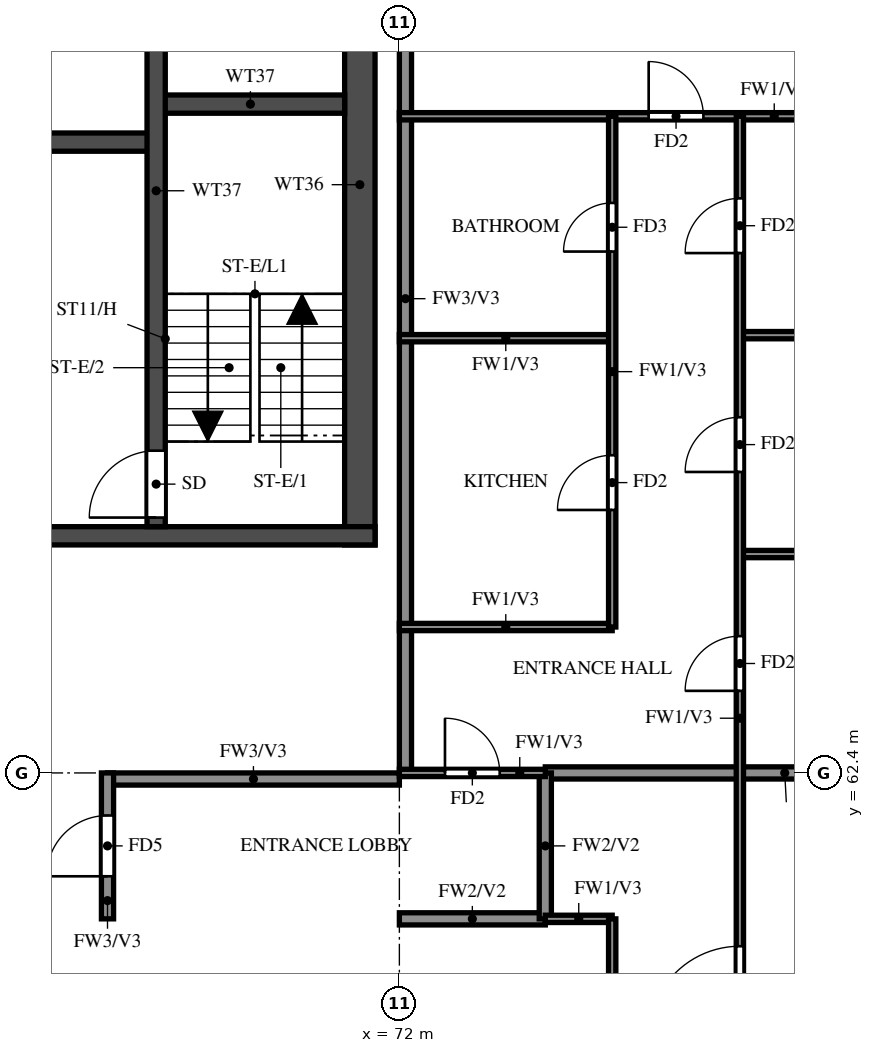
"""IFC4 building model, lengths in metres.
Left out: names, types, materials, properties, quantities, classifications, styles, units other than length and angle.
Written with IfcOpenShell. Run it as: python <this file> out.ifc"""

import sys

from ifc_helpers import new_model, si_unit, direction, frame, frame_2d, origin, place, context, subcontext, project, spatial, rectangle, extrude, element, fill, save


model = new_model("IFC4")
c1 = context("Model", 3, precision=1e-05, world=origin(), true_north=direction((0.0, 1.0)))
c2 = subcontext(c1, "Body", "Model", "MODEL_VIEW")
j1 = project(units=[si_unit("LENGTHUNIT", "METRE"), si_unit("PLANEANGLEUNIT", "RADIAN")], contexts=[c1])
p1 = place(None, origin())
s1 = spatial("IfcSite", under=j1, at=p1, CompositionType="ELEMENT")
p2 = place(p1, origin())
s2 = spatial("IfcBuilding", under=s1, at=p2, CompositionType="ELEMENT")
p3 = place(p2, frame((0.0, 0.0, 222.0)))
s3 = spatial("IfcBuildingStorey", under=s2, at=p3, CompositionType="ELEMENT", Elevation=222.0)
p4 = place(p3, frame((71.35, 66.15, 0.0), z_axis=(0.0, 0.0, 1.0), x_axis=(0.0, 1.0, 0.0)))
e1 = element("IfcWall", 1, at=p4, inside=s3, PredefinedType="SHEAR", context=c2, shape_type="SweptSolid", body=[
    extrude(rectangle(XDim=11.85, YDim=0.5, at=frame_2d((5.925, 0.0))), origin(), (0.0, 0.0, 1.0), 3.22),
])
p5 = place(p3, frame((29.2, 66.3, 0.0), z_axis=(0.0, 0.0, 1.0), x_axis=(1.0, 0.0, 0.0)))
e2 = element("IfcWall", 2, at=p5, inside=s3, PredefinedType="SHEAR", context=c2, shape_type="SweptSolid", body=[
    extrude(rectangle(XDim=42.4, YDim=0.3, at=frame_2d((21.2, 0.0))), origin(), (0.0, 0.0, 1.0), 3.22),
])
p6 = place(p5, frame((1.425, 0.0, 0.0)))
e3 = element("IfcOpeningElement", 3, at=p6, cuts=e2, PredefinedType="OPENING", context=c2, shape_type="SweptSolid", body=[
    extrude(rectangle(XDim=1.1, YDim=2.1, at=frame_2d((0.55, 1.05))), frame((0.0, 0.16, 0.0), z_axis=(0.0, -1.0, 0.0), x_axis=(1.0, 0.0, 0.0)), (0.0, 0.0, 1.0), 0.32),
])
p7 = place(p5, frame((4.2, 0.0, 0.0)))
e4 = element("IfcOpeningElement", 4, at=p7, cuts=e2, PredefinedType="OPENING", context=c2, shape_type="SweptSolid", body=[
    extrude(rectangle(XDim=1.8, YDim=2.1, at=frame_2d((0.9, 1.05))), frame((0.0, 0.16, 0.0), z_axis=(0.0, -1.0, 0.0), x_axis=(1.0, 0.0, 0.0)), (0.0, 0.0, 1.0), 0.32),
])
p8 = place(p3, frame((32.8, 72.775, 0.0), z_axis=(0.0, 0.0, 1.0), x_axis=(1.0, 0.0, 0.0)))
e5 = element("IfcWall", 5, at=p8, inside=s3, PredefinedType="SHEAR", context=c2, shape_type="SweptSolid", body=[
    extrude(rectangle(XDim=35.2, YDim=0.3, at=frame_2d((17.6, 0.0))), origin(), (0.0, 0.0, 1.0), 3.22),
])
p9 = place(p8, frame((19.8, 0.0, 0.0)))
e6 = element("IfcOpeningElement", 6, at=p9, cuts=e5, PredefinedType="OPENING", context=c2, shape_type="SweptSolid", body=[
    extrude(rectangle(XDim=1.1, YDim=2.1, at=frame_2d((0.55, 1.05))), frame((0.0, 0.16, 0.0), z_axis=(0.0, -1.0, 0.0), x_axis=(1.0, 0.0, 0.0)), (0.0, 0.0, 1.0), 0.32),
])
p10 = place(p8, frame((27.725, 0.0, 0.0)))
e7 = element("IfcOpeningElement", 7, at=p10, cuts=e5, PredefinedType="OPENING", context=c2, shape_type="SweptSolid", body=[
    extrude(rectangle(XDim=1.1, YDim=2.1, at=frame_2d((0.55, 1.05))), frame((0.0, 0.16, 0.0), z_axis=(0.0, -1.0, 0.0), x_axis=(1.0, 0.0, 0.0)), (0.0, 0.0, 1.0), 0.32),
])
p11 = place(p8, frame((30.325, 0.0, 0.0)))
e8 = element("IfcOpeningElement", 8, at=p11, cuts=e5, PredefinedType="OPENING", context=c2, shape_type="SweptSolid", body=[
    extrude(rectangle(XDim=1.1, YDim=2.1, at=frame_2d((0.55, 1.05))), frame((0.0, 0.16, 0.0), z_axis=(0.0, -1.0, 0.0), x_axis=(1.0, 0.0, 0.0)), (0.0, 0.0, 1.0), 0.32),
])
p12 = place(p8, frame((3.825, 0.0, 0.0)))
e9 = element("IfcOpeningElement", 9, at=p12, cuts=e5, PredefinedType="OPENING", context=c2, shape_type="SweptSolid", body=[
    extrude(rectangle(XDim=1.1, YDim=2.1, at=frame_2d((0.55, 1.05))), frame((0.0, 0.16, 0.0), z_axis=(0.0, -1.0, 0.0), x_axis=(1.0, 0.0, 0.0)), (0.0, 0.0, 1.0), 0.32),
])
p13 = place(p8, frame((6.575, 0.0, 0.0)))
e10 = element("IfcOpeningElement", 10, at=p13, cuts=e5, PredefinedType="OPENING", context=c2, shape_type="SweptSolid", body=[
    extrude(rectangle(XDim=1.1, YDim=2.1, at=frame_2d((0.55, 1.05))), frame((0.0, 0.16, 0.0), z_axis=(0.0, -1.0, 0.0), x_axis=(1.0, 0.0, 0.0)), (0.0, 0.0, 1.0), 0.32),
])
p14 = place(p8, frame((9.325, 0.0, 0.0)))
e11 = element("IfcOpeningElement", 11, at=p14, cuts=e5, PredefinedType="OPENING", context=c2, shape_type="SweptSolid", body=[
    extrude(rectangle(XDim=1.1, YDim=2.1, at=frame_2d((0.55, 1.05))), frame((0.0, 0.16, 0.0), z_axis=(0.0, -1.0, 0.0), x_axis=(1.0, 0.0, 0.0)), (0.0, 0.0, 1.0), 0.32),
])
p15 = place(p8, frame((12.075, 0.0, 0.0)))
e12 = element("IfcOpeningElement", 12, at=p15, cuts=e5, PredefinedType="OPENING", context=c2, shape_type="SweptSolid", body=[
    extrude(rectangle(XDim=1.1, YDim=2.1, at=frame_2d((0.55, 1.05))), frame((0.0, 0.16, 0.0), z_axis=(0.0, -1.0, 0.0), x_axis=(1.0, 0.0, 0.0)), (0.0, 0.0, 1.0), 0.32),
])
p16 = place(p8, frame((14.825, 0.0, 0.0)))
e13 = element("IfcOpeningElement", 13, at=p16, cuts=e5, PredefinedType="OPENING", context=c2, shape_type="SweptSolid", body=[
    extrude(rectangle(XDim=1.1, YDim=2.1, at=frame_2d((0.55, 1.05))), frame((0.0, 0.16, 0.0), z_axis=(0.0, -1.0, 0.0), x_axis=(1.0, 0.0, 0.0)), (0.0, 0.0, 1.0), 0.32),
])
p17 = place(p8, frame((17.575, 0.0, 0.0)))
e14 = element("IfcOpeningElement", 14, at=p17, cuts=e5, PredefinedType="OPENING", context=c2, shape_type="SweptSolid", body=[
    extrude(rectangle(XDim=1.1, YDim=2.1, at=frame_2d((0.55, 1.05))), frame((0.0, 0.16, 0.0), z_axis=(0.0, -1.0, 0.0), x_axis=(1.0, 0.0, 0.0)), (0.0, 0.0, 1.0), 0.32),
])
p18 = place(p8, frame((0.95, 0.0, 0.0)))
e15 = element("IfcOpeningElement", 15, at=p18, cuts=e5, PredefinedType="OPENING", context=c2, shape_type="SweptSolid", body=[
    extrude(rectangle(XDim=1.1, YDim=2.1, at=frame_2d((0.55, 1.05))), frame((0.0, 0.16, 0.0), z_axis=(0.0, -1.0, 0.0), x_axis=(1.0, 0.0, 0.0)), (0.0, 0.0, 1.0), 0.32),
])
p19 = place(p3, frame((68.0, 73.4, 0.0), z_axis=(0.0, 0.0, 1.0), x_axis=(1.0, 0.0, 0.0)))
e16 = element("IfcWall", 16, at=p19, inside=s3, PredefinedType="SHEAR", context=c2, shape_type="SweptSolid", body=[
    extrude(rectangle(XDim=3.1, YDim=0.3, at=frame_2d((1.55, 0.0))), origin(), (0.0, 0.0, 1.0), 3.22),
])
p20 = place(p3, frame((68.0, 66.45, 0.0), z_axis=(0.0, 0.0, 1.0), x_axis=(0.0, 1.0, 0.0)))
e17 = element("IfcWall", 17, at=p20, inside=s3, PredefinedType="SHEAR", context=c2, shape_type="SweptSolid", body=[
    extrude(rectangle(XDim=11.05, YDim=0.3, at=frame_2d((5.525, 0.0))), origin(), (0.0, 0.0, 1.0), 3.22),
])
p21 = place(p20, frame((0.15, 0.0, 0.0)))
e18 = element("IfcOpeningElement", 18, at=p21, cuts=e17, PredefinedType="OPENING", context=c2, shape_type="SweptSolid", body=[
    extrude(rectangle(XDim=1.1, YDim=2.1, at=frame_2d((0.55, 1.05))), frame((0.0, 0.16, 0.0), z_axis=(0.0, -1.0, 0.0), x_axis=(1.0, 0.0, 0.0)), (0.0, 0.0, 1.0), 0.32),
])
p22 = place(p3, frame((67.2, 62.3, 0.0), z_axis=(0.0, 0.0, 1.0), x_axis=(1.0, 0.0, 0.0)))
e19 = element("IfcWall", 19, at=p22, inside=s3, PredefinedType="SOLIDWALL", context=c2, shape_type="SweptSolid", body=[
    extrude(rectangle(XDim=4.8, YDim=0.2, at=frame_2d((2.4, 0.0))), origin(), (0.0, 0.0, 1.0), 3.22),
])
p23 = place(p3, frame((67.2, 60.0, 0.0), z_axis=(0.0, 0.0, 1.0), x_axis=(0.0, 1.0, 0.0)))
e20 = element("IfcWall", 20, at=p23, inside=s3, PredefinedType="SOLIDWALL", context=c2, shape_type="SweptSolid", body=[
    extrude(rectangle(XDim=2.4, YDim=0.2, at=frame_2d((1.2, 0.0))), origin(), (0.0, 0.0, 1.0), 3.22),
])
p24 = place(p23, frame((0.7, 0.0, 0.0)))
e21 = element("IfcOpeningElement", 21, at=p24, cuts=e20, PredefinedType="OPENING", context=c2, shape_type="SweptSolid", body=[
    extrude(rectangle(XDim=1.0, YDim=2.1, at=frame_2d((0.5, 1.05))), frame((0.0, 0.11, 0.0), z_axis=(0.0, -1.0, 0.0), x_axis=(1.0, 0.0, 0.0)), (0.0, 0.0, 1.0), 0.22),
])
p25 = place(p3, frame((72.1, 62.4, 0.0), z_axis=(0.0, 0.0, 1.0), x_axis=(0.0, 1.0, 0.0)))
e22 = element("IfcWall", 22, at=p25, inside=s3, PredefinedType="SOLIDWALL", context=c2, shape_type="SweptSolid", body=[
    extrude(rectangle(XDim=15.6, YDim=0.2, at=frame_2d((7.8, 0.0))), origin(), (0.0, 0.0, 1.0), 3.22),
])
p26 = place(p3, frame((72.0, 60.0, 0.0), z_axis=(0.0, 0.0, 1.0), x_axis=(1.0, 0.0, 0.0)))
e23 = element("IfcWall", 23, at=p26, inside=s3, PredefinedType="SOLIDWALL", context=c2, shape_type="SweptSolid", body=[
    extrude(rectangle(XDim=2.4, YDim=0.2, at=frame_2d((1.2, 0.0))), origin(), (0.0, 0.0, 1.0), 3.22),
])
p27 = place(p3, frame((74.4, 62.4, 0.0), z_axis=(0.0, 0.0, 1.0), x_axis=(1.0, 0.0, 0.0)))
e24 = element("IfcWall", 24, at=p27, inside=s3, PredefinedType="SOLIDWALL", context=c2, shape_type="SweptSolid", body=[
    extrude(rectangle(XDim=7.875, YDim=0.2, at=frame_2d((3.938, 0.0))), origin(), (0.0, 0.0, 1.0), 3.22),
])
p28 = place(p3, frame((74.4, 60.0, 0.0), z_axis=(0.0, 0.0, 1.0), x_axis=(0.0, 1.0, 0.0)))
e25 = element("IfcWall", 25, at=p28, inside=s3, PredefinedType="SOLIDWALL", context=c2, shape_type="SweptSolid", body=[
    extrude(rectangle(XDim=2.4, YDim=0.2, at=frame_2d((1.2, 0.0))), origin(), (0.0, 0.0, 1.0), 3.22),
])
p29 = place(p3, frame((74.4, 60.0, 0.0), z_axis=(0.0, 0.0, 1.0), x_axis=(1.0, 0.0, 0.0)))
e26 = element("IfcWall", 26, at=p29, inside=s3, PredefinedType="PARTITIONING", context=c2, shape_type="SweptSolid", body=[
    extrude(rectangle(XDim=1.1, YDim=0.12, at=frame_2d((0.55, 0.0))), origin(), (0.0, 0.0, 1.0), 3.22),
])
p30 = place(p3, frame((72.0, 62.4, 0.0), z_axis=(0.0, 0.0, 1.0), x_axis=(1.0, 0.0, 0.0)))
e27 = element("IfcWall", 27, at=p30, inside=s3, PredefinedType="PARTITIONING", context=c2, shape_type="SweptSolid", body=[
    extrude(rectangle(XDim=2.4, YDim=0.12, at=frame_2d((1.2, 0.0))), origin(), (0.0, 0.0, 1.0), 3.22),
])
p31 = place(p30, frame((0.75, 0.0, 0.0)))
e28 = element("IfcOpeningElement", 28, at=p31, cuts=e27, PredefinedType="OPENING", context=c2, shape_type="SweptSolid", body=[
    extrude(rectangle(XDim=0.9, YDim=2.1, at=frame_2d((0.45, 1.05))), frame((0.0, 0.07, 0.0), z_axis=(0.0, -1.0, 0.0), x_axis=(1.0, 0.0, 0.0)), (0.0, 0.0, 1.0), 0.14),
])
p32 = place(p3, frame((72.0, 64.8, 0.0), z_axis=(0.0, 0.0, 1.0), x_axis=(1.0, 0.0, 0.0)))
e29 = element("IfcWall", 29, at=p32, inside=s3, PredefinedType="PARTITIONING", context=c2, shape_type="SweptSolid", body=[
    extrude(rectangle(XDim=3.5, YDim=0.12, at=frame_2d((1.75, 0.0))), origin(), (0.0, 0.0, 1.0), 3.22),
])
p33 = place(p3, frame((77.6, 66.0, 0.0), z_axis=(0.0, 0.0, 1.0), x_axis=(1.0, 0.0, 0.0)))
e30 = element("IfcWall", 30, at=p33, inside=s3, PredefinedType="PARTITIONING", context=c2, shape_type="SweptSolid", body=[
    extrude(rectangle(XDim=4.675, YDim=0.12, at=frame_2d((2.337, 0.0))), origin(), (0.0, 0.0, 1.0), 2.32),
])
p34 = place(p3, frame((72.0, 69.55, 0.0), z_axis=(0.0, 0.0, 1.0), x_axis=(1.0, 0.0, 0.0)))
e31 = element("IfcWall", 31, at=p34, inside=s3, PredefinedType="PARTITIONING", context=c2, shape_type="SweptSolid", body=[
    extrude(rectangle(XDim=3.5, YDim=0.12, at=frame_2d((1.75, 0.0))), origin(), (0.0, 0.0, 1.0), 3.22),
])
p35 = place(p3, frame((77.6, 69.6, 0.0), z_axis=(0.0, 0.0, 1.0), x_axis=(1.0, 0.0, 0.0)))
e32 = element("IfcWall", 32, at=p35, inside=s3, PredefinedType="PARTITIONING", context=c2, shape_type="SweptSolid", body=[
    extrude(rectangle(XDim=4.675, YDim=0.12, at=frame_2d((2.337, 0.0))), origin(), (0.0, 0.0, 1.0), 3.22),
])
p36 = place(p3, frame((72.0, 73.2, 0.0), z_axis=(0.0, 0.0, 1.0), x_axis=(1.0, 0.0, 0.0)))
e33 = element("IfcWall", 33, at=p36, inside=s3, PredefinedType="PARTITIONING", context=c2, shape_type="SweptSolid", body=[
    extrude(rectangle(XDim=10.275, YDim=0.12, at=frame_2d((5.137, 0.0))), origin(), (0.0, 0.0, 1.0), 2.32),
])
p37 = place(p36, frame((4.1, 0.0, 0.0)))
e34 = element("IfcOpeningElement", 34, at=p37, cuts=e33, PredefinedType="OPENING", context=c2, shape_type="SweptSolid", body=[
    extrude(rectangle(XDim=0.9, YDim=2.1, at=frame_2d((0.45, 1.05))), frame((0.0, 0.07, 0.0), z_axis=(0.0, -1.0, 0.0), x_axis=(1.0, 0.0, 0.0)), (0.0, 0.0, 1.0), 0.14),
])
p38 = place(p3, frame((75.5, 56.4, 0.0), z_axis=(0.0, 0.0, 1.0), x_axis=(0.0, 1.0, 0.0)))
e35 = element("IfcWall", 35, at=p38, inside=s3, PredefinedType="PARTITIONING", context=c2, shape_type="SweptSolid", body=[
    extrude(rectangle(XDim=3.6, YDim=0.12, at=frame_2d((1.8, 0.0))), origin(), (0.0, 0.0, 1.0), 3.22),
])
p39 = place(p38, frame((1.35, 0.0, 0.0)))
e36 = element("IfcOpeningElement", 36, at=p39, cuts=e35, PredefinedType="OPENING", context=c2, shape_type="SweptSolid", body=[
    extrude(rectangle(XDim=0.9, YDim=2.1, at=frame_2d((0.45, 1.05))), frame((0.0, 0.07, 0.0), z_axis=(0.0, -1.0, 0.0), x_axis=(1.0, 0.0, 0.0)), (0.0, 0.0, 1.0), 0.14),
])
p40 = place(p3, frame((75.5, 64.8, 0.0), z_axis=(0.0, 0.0, 1.0), x_axis=(0.0, 1.0, 0.0)))
e37 = element("IfcWall", 37, at=p40, inside=s3, PredefinedType="PARTITIONING", context=c2, shape_type="SweptSolid", body=[
    extrude(rectangle(XDim=8.4, YDim=0.12, at=frame_2d((4.2, 0.0))), origin(), (0.0, 0.0, 1.0), 3.22),
])
p41 = place(p40, frame((1.925, 0.0, 0.0)))
e38 = element("IfcOpeningElement", 38, at=p41, cuts=e37, PredefinedType="OPENING", context=c2, shape_type="SweptSolid", body=[
    extrude(rectangle(XDim=0.9, YDim=2.1, at=frame_2d((0.45, 1.05))), frame((0.0, 0.07, 0.0), z_axis=(0.0, -1.0, 0.0), x_axis=(1.0, 0.0, 0.0)), (0.0, 0.0, 1.0), 0.14),
])
p42 = place(p40, frame((6.175, 0.0, 0.0)))
e39 = element("IfcOpeningElement", 39, at=p42, cuts=e37, PredefinedType="OPENING", context=c2, shape_type="SweptSolid", body=[
    extrude(rectangle(XDim=0.8, YDim=2.1, at=frame_2d((0.4, 1.05))), frame((0.0, 0.07, 0.0), z_axis=(0.0, -1.0, 0.0), x_axis=(1.0, 0.0, 0.0)), (0.0, 0.0, 1.0), 0.14),
])
p43 = place(p3, frame((77.6, 55.2, 0.0), z_axis=(0.0, 0.0, 1.0), x_axis=(0.0, 1.0, 0.0)))
e40 = element("IfcWall", 40, at=p43, inside=s3, PredefinedType="PARTITIONING", context=c2, shape_type="SweptSolid", body=[
    extrude(rectangle(XDim=18.0, YDim=0.12, at=frame_2d((9.0, 0.0))), origin(), (0.0, 0.0, 1.0), 3.22),
])
p44 = place(p43, frame((2.85, 0.0, 0.0)))
e41 = element("IfcOpeningElement", 41, at=p44, cuts=e40, PredefinedType="OPENING", context=c2, shape_type="SweptSolid", body=[
    extrude(rectangle(XDim=1.5, YDim=2.1, at=frame_2d((0.75, 1.05))), frame((0.0, 0.07, 0.0), z_axis=(0.0, -1.0, 0.0), x_axis=(1.0, 0.0, 0.0)), (0.0, 0.0, 1.0), 0.14),
])
p45 = place(p43, frame((8.55, 0.0, 0.0)))
e42 = element("IfcOpeningElement", 42, at=p45, cuts=e40, PredefinedType="OPENING", context=c2, shape_type="SweptSolid", body=[
    extrude(rectangle(XDim=0.9, YDim=2.1, at=frame_2d((0.45, 1.05))), frame((0.0, 0.07, 0.0), z_axis=(0.0, -1.0, 0.0), x_axis=(1.0, 0.0, 0.0)), (0.0, 0.0, 1.0), 0.14),
])
p46 = place(p43, frame((12.15, 0.0, 0.0)))
e43 = element("IfcOpeningElement", 43, at=p46, cuts=e40, PredefinedType="OPENING", context=c2, shape_type="SweptSolid", body=[
    extrude(rectangle(XDim=0.9, YDim=2.1, at=frame_2d((0.45, 1.05))), frame((0.0, 0.07, 0.0), z_axis=(0.0, -1.0, 0.0), x_axis=(1.0, 0.0, 0.0)), (0.0, 0.0, 1.0), 0.14),
])
p47 = place(p43, frame((15.75, 0.0, 0.0)))
e44 = element("IfcOpeningElement", 44, at=p47, cuts=e40, PredefinedType="OPENING", context=c2, shape_type="SweptSolid", body=[
    extrude(rectangle(XDim=0.9, YDim=2.1, at=frame_2d((0.45, 1.05))), frame((0.0, 0.07, 0.0), z_axis=(0.0, -1.0, 0.0), x_axis=(1.0, 0.0, 0.0)), (0.0, 0.0, 1.0), 0.14),
])
p48 = place(p21, origin())
e45 = element("IfcDoor", 45, at=p48, inside=s3, OperationType="SINGLE_SWING_RIGHT", PredefinedType="DOOR", context=c2, shape_type="SweptSolid", body=[
    extrude(rectangle(XDim=1.1, YDim=2.1, at=frame_2d((0.55, 1.05))), frame((0.0, 0.025, 0.0), z_axis=(0.0, -1.0, 0.0), x_axis=(1.0, 0.0, 0.0)), (0.0, 0.0, 1.0), 0.05),
])
fill(e18, e45)
p49 = place(p44, origin())
e46 = element("IfcDoor", 46, at=p49, inside=s3, OperationType="SINGLE_SWING_LEFT", PredefinedType="DOOR", context=c2, shape_type="SweptSolid", body=[
    extrude(rectangle(XDim=1.5, YDim=2.1, at=frame_2d((0.75, 1.05))), frame((0.0, 0.025, 0.0), z_axis=(0.0, -1.0, 0.0), x_axis=(1.0, 0.0, 0.0)), (0.0, 0.0, 1.0), 0.05),
])
fill(e41, e46)
p50 = place(p31, origin())
e47 = element("IfcDoor", 47, at=p50, inside=s3, OperationType="SINGLE_SWING_RIGHT", PredefinedType="DOOR", context=c2, shape_type="SweptSolid", body=[
    extrude(rectangle(XDim=0.9, YDim=2.1, at=frame_2d((0.45, 1.05))), frame((0.0, 0.025, 0.0), z_axis=(0.0, -1.0, 0.0), x_axis=(1.0, 0.0, 0.0)), (0.0, 0.0, 1.0), 0.05),
])
fill(e28, e47)
p51 = place(p24, origin())
e48 = element("IfcDoor", 48, at=p51, inside=s3, OperationType="SINGLE_SWING_LEFT", PredefinedType="DOOR", context=c2, shape_type="SweptSolid", body=[
    extrude(rectangle(XDim=1.0, YDim=2.1, at=frame_2d((0.5, 1.05))), frame((0.0, 0.025, 0.0), z_axis=(0.0, -1.0, 0.0), x_axis=(1.0, 0.0, 0.0)), (0.0, 0.0, 1.0), 0.05),
])
fill(e21, e48)
p52 = place(p45, origin())
e49 = element("IfcDoor", 49, at=p52, inside=s3, OperationType="SINGLE_SWING_LEFT", PredefinedType="DOOR", context=c2, shape_type="SweptSolid", body=[
    extrude(rectangle(XDim=0.9, YDim=2.1, at=frame_2d((0.45, 1.05))), frame((0.0, 0.025, 0.0), z_axis=(0.0, -1.0, 0.0), x_axis=(1.0, 0.0, 0.0)), (0.0, 0.0, 1.0), 0.05),
])
fill(e42, e49)
p53 = place(p46, origin())
e50 = element("IfcDoor", 50, at=p53, inside=s3, OperationType="SINGLE_SWING_RIGHT", PredefinedType="DOOR", context=c2, shape_type="SweptSolid", body=[
    extrude(rectangle(XDim=0.9, YDim=2.1, at=frame_2d((0.45, 1.05))), frame((0.0, 0.025, 0.0), z_axis=(0.0, -1.0, 0.0), x_axis=(1.0, 0.0, 0.0)), (0.0, 0.0, 1.0), 0.05),
])
fill(e43, e50)
p54 = place(p47, origin())
e51 = element("IfcDoor", 51, at=p54, inside=s3, OperationType="SINGLE_SWING_LEFT", PredefinedType="DOOR", context=c2, shape_type="SweptSolid", body=[
    extrude(rectangle(XDim=0.9, YDim=2.1, at=frame_2d((0.45, 1.05))), frame((0.0, 0.025, 0.0), z_axis=(0.0, -1.0, 0.0), x_axis=(1.0, 0.0, 0.0)), (0.0, 0.0, 1.0), 0.05),
])
fill(e44, e51)
p55 = place(p37, origin())
e52 = element("IfcDoor", 52, at=p55, inside=s3, OperationType="SINGLE_SWING_LEFT", PredefinedType="DOOR", context=c2, shape_type="SweptSolid", body=[
    extrude(rectangle(XDim=0.9, YDim=2.1, at=frame_2d((0.45, 1.05))), frame((0.0, 0.025, 0.0), z_axis=(0.0, -1.0, 0.0), x_axis=(1.0, 0.0, 0.0)), (0.0, 0.0, 1.0), 0.05),
])
fill(e34, e52)
p56 = place(p41, origin())
e53 = element("IfcDoor", 53, at=p56, inside=s3, OperationType="SINGLE_SWING_RIGHT", PredefinedType="DOOR", context=c2, shape_type="SweptSolid", body=[
    extrude(rectangle(XDim=0.9, YDim=2.1, at=frame_2d((0.45, 1.05))), frame((0.0, 0.025, 0.0), z_axis=(0.0, -1.0, 0.0), x_axis=(1.0, 0.0, 0.0)), (0.0, 0.0, 1.0), 0.05),
])
fill(e38, e53)
p57 = place(p42, origin())
e54 = element("IfcDoor", 54, at=p57, inside=s3, OperationType="SINGLE_SWING_LEFT", PredefinedType="DOOR", context=c2, shape_type="SweptSolid", body=[
    extrude(rectangle(XDim=0.8, YDim=2.1, at=frame_2d((0.4, 1.05))), frame((0.0, 0.025, 0.0), z_axis=(0.0, -1.0, 0.0), x_axis=(1.0, 0.0, 0.0)), (0.0, 0.0, 1.0), 0.05),
])
fill(e39, e54)
save(model, sys.argv[1])
